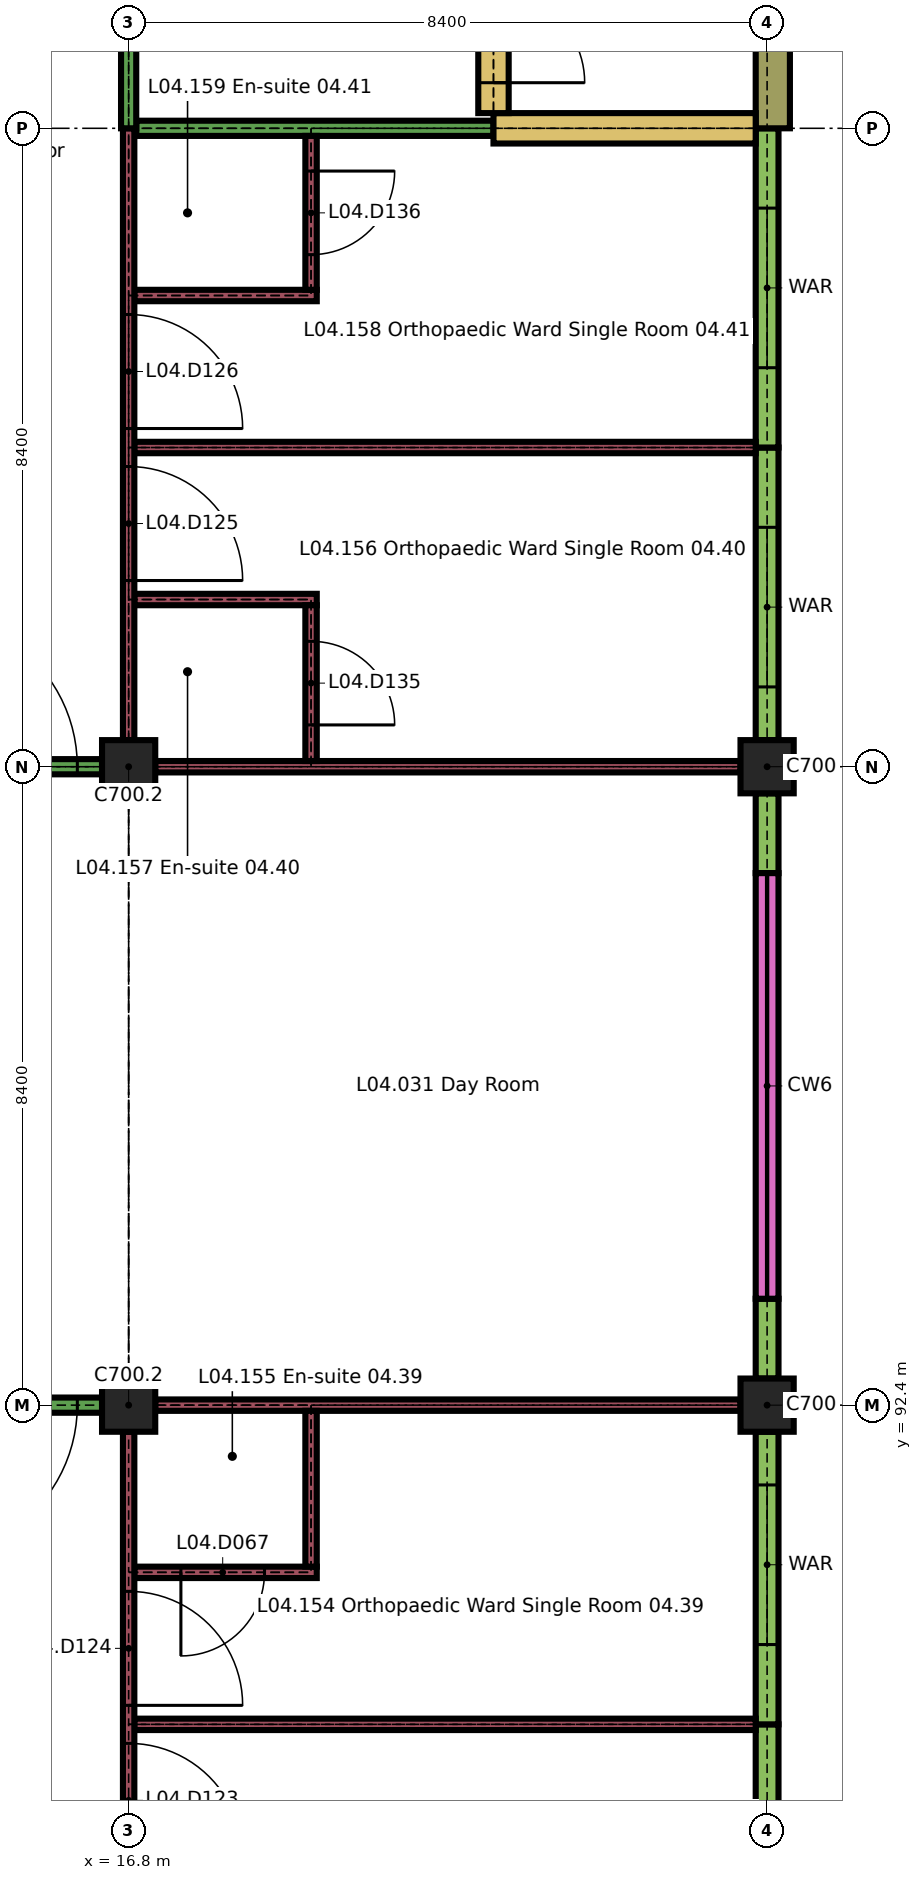
"""IFC4 building model, lengths in metres.
Left out: names, types, materials, properties, quantities, classifications, styles, units other than length and angle.
Written with IfcOpenShell. Run it as: python <this file> out.ifc"""

import sys

from ifc_helpers import new_model, si_unit, direction, frame, frame_2d, origin, origin_2d, place, context, subcontext, project, spatial, rectangle, extrude, element, fill, save


model = new_model("IFC4")
c1 = context("Model", 3, precision=1e-05, world=origin(), true_north=direction((0.0, 1.0)))
c2 = subcontext(c1, "Body", "Model", "MODEL_VIEW")
j1 = project(units=[si_unit("LENGTHUNIT", "METRE"), si_unit("PLANEANGLEUNIT", "RADIAN")], contexts=[c1])
p1 = place(None, origin())
s1 = spatial("IfcSite", under=j1, at=p1, CompositionType="ELEMENT")
p2 = place(p1, origin())
s2 = spatial("IfcBuilding", under=s1, at=p2, CompositionType="ELEMENT")
p3 = place(p2, frame((0.0, 0.0, 18.9)))
s3 = spatial("IfcBuildingStorey", under=s2, at=p3, CompositionType="ELEMENT", Elevation=18.9)
for number, where, z_axis, x_axis in (
    (1, (16.8, 92.4, 0.0), (0.0, 0.0, 1.0), (1.0, 0.0, 0.0)),
    (2, (25.2, 92.4, 0.0), (0.0, 0.0, 1.0), (1.0, 0.0, 0.0)),
    (3, (16.8, 100.8, 0.0), (0.0, 0.0, 1.0), (1.0, 0.0, 0.0)),
    (4, (25.2, 100.8, 0.0), (0.0, 0.0, 1.0), (1.0, 0.0, 0.0)),
):
    element("IfcColumn", number, at=place(p3, frame(where, z_axis=z_axis, x_axis=x_axis)), inside=s3, PredefinedType="COLUMN", context=c2, shape_type="SweptSolid", body=[
        extrude(rectangle(XDim=0.7, YDim=0.7, at=origin_2d()), origin(), (0.0, 0.0, 1.0), 3.26),
    ])
p4 = place(p3, frame((25.2, 84.0, 0.0), z_axis=(0.0, 0.0, 1.0), x_axis=(0.0, 1.0, 0.0)))
e5 = element("IfcWall", 5, at=p4, inside=s3, PredefinedType="SOLIDWALL", context=c2, shape_type="SweptSolid", body=[
    extrude(rectangle(XDim=4.2, YDim=0.3, at=frame_2d((2.1, 0.0))), origin(), (0.0, 0.0, 1.0), 2.96),
])
p5 = place(p4, frame((1.05, 0.0, 0.9)))
e6 = element("IfcOpeningElement", 6, at=p5, cuts=e5, PredefinedType="OPENING", context=c2, shape_type="SweptSolid", body=[
    extrude(rectangle(XDim=2.1, YDim=1.5, at=frame_2d((1.05, 0.75))), frame((0.0, 0.16, 0.0), z_axis=(0.0, -1.0, 0.0), x_axis=(1.0, 0.0, 0.0)), (0.0, 0.0, 1.0), 0.32),
])
p6 = place(p3, frame((25.2, 88.2, 0.0), z_axis=(0.0, 0.0, 1.0), x_axis=(0.0, 1.0, 0.0)))
e7 = element("IfcWall", 7, at=p6, inside=s3, PredefinedType="SOLIDWALL", context=c2, shape_type="SweptSolid", body=[
    extrude(rectangle(XDim=3.85, YDim=0.3, at=frame_2d((1.925, 0.0))), origin(), (0.0, 0.0, 1.0), 2.96),
])
p7 = place(p6, frame((1.05, 0.0, 0.9)))
e8 = element("IfcOpeningElement", 8, at=p7, cuts=e7, PredefinedType="OPENING", context=c2, shape_type="SweptSolid", body=[
    extrude(rectangle(XDim=2.1, YDim=1.5, at=frame_2d((1.05, 0.75))), frame((0.0, 0.16, 0.0), z_axis=(0.0, -1.0, 0.0), x_axis=(1.0, 0.0, 0.0)), (0.0, 0.0, 1.0), 0.32),
])
for number, where, z_axis, x_axis in (
    (9, (25.2, 92.75, 0.0), (0.0, 0.0, 1.0), (0.0, 1.0, 0.0)),
    (10, (25.2, 99.4, 0.0), (0.0, 0.0, 1.0), (0.0, 1.0, 0.0)),
):
    element("IfcWall", number, at=place(p3, frame(where, z_axis=z_axis, x_axis=x_axis)), inside=s3, PredefinedType="SOLIDWALL", context=c2, shape_type="SweptSolid", body=[
        extrude(rectangle(XDim=1.05, YDim=0.3, at=frame_2d((0.525, 0.0))), origin(), (0.0, 0.0, 1.0), 2.96),
    ])
p8 = place(p3, frame((25.2, 93.8, 0.0), z_axis=(0.0, 0.0, 1.0), x_axis=(0.0, 1.0, 0.0)))
e11 = element("IfcWall", 11, at=p8, inside=s3, PredefinedType="SOLIDWALL", context=c2, shape_type="SweptSolid", body=[
    extrude(rectangle(XDim=5.6, YDim=0.3, at=frame_2d((2.8, 0.0))), origin(), (0.0, 0.0, 1.0), 0.6),
])
p9 = place(p3, frame((25.2, 101.15, 0.0), z_axis=(0.0, 0.0, 1.0), x_axis=(0.0, 1.0, 0.0)))
e12 = element("IfcWall", 12, at=p9, inside=s3, PredefinedType="SOLIDWALL", context=c2, shape_type="SweptSolid", body=[
    extrude(rectangle(XDim=3.85, YDim=0.3, at=frame_2d((1.925, 0.0))), origin(), (0.0, 0.0, 1.0), 2.96),
])
p10 = place(p9, frame((0.7, 0.0, 0.9)))
e13 = element("IfcOpeningElement", 13, at=p10, cuts=e12, PredefinedType="OPENING", context=c2, shape_type="SweptSolid", body=[
    extrude(rectangle(XDim=2.1, YDim=1.5, at=frame_2d((1.05, 0.75))), frame((0.0, 0.16, 0.0), z_axis=(0.0, -1.0, 0.0), x_axis=(1.0, 0.0, 0.0)), (0.0, 0.0, 1.0), 0.32),
])
p11 = place(p3, frame((25.2, 105.0, 0.0), z_axis=(0.0, 0.0, 1.0), x_axis=(0.0, 1.0, 0.0)))
e14 = element("IfcWall", 14, at=p11, inside=s3, PredefinedType="SOLIDWALL", context=c2, shape_type="SweptSolid", body=[
    extrude(rectangle(XDim=4.2, YDim=0.3, at=frame_2d((2.1, 0.0))), origin(), (0.0, 0.0, 1.0), 2.96),
])
p12 = place(p11, frame((1.05, 0.0, 0.9)))
e15 = element("IfcOpeningElement", 15, at=p12, cuts=e14, PredefinedType="OPENING", context=c2, shape_type="SweptSolid", body=[
    extrude(rectangle(XDim=2.1, YDim=1.5, at=frame_2d((1.05, 0.75))), frame((0.0, 0.16, 0.0), z_axis=(0.0, -1.0, 0.0), x_axis=(1.0, 0.0, 0.0)), (0.0, 0.0, 1.0), 0.32),
])
p13 = place(p3, frame((25.275, 109.2, 0.0), z_axis=(0.0, 0.0, 1.0), x_axis=(0.0, 1.0, 0.0)))
e16 = element("IfcWall", 16, at=p13, inside=s3, PredefinedType="SOLIDWALL", context=c2, shape_type="SweptSolid", body=[
    extrude(rectangle(XDim=3.15, YDim=0.45, at=frame_2d((1.575, 0.0))), origin(), (0.0, 0.0, 1.0), 3.26),
])
p14 = place(p3, frame((16.875, 88.2, 0.0), z_axis=(0.0, 0.0, 1.0), x_axis=(1.0, 0.0, 0.0)))
e17 = element("IfcWall", 17, at=p14, inside=s3, PredefinedType="PARTITIONING", context=c2, shape_type="SweptSolid", body=[
    extrude(rectangle(XDim=8.175, YDim=0.15, at=frame_2d((4.087, 0.0))), origin(), (0.0, 0.0, 1.0), 3.26),
])
p15 = place(p3, frame((16.875, 90.2, 0.0), z_axis=(0.0, 0.0, 1.0), x_axis=(1.0, 0.0, 0.0)))
e18 = element("IfcWall", 18, at=p15, inside=s3, PredefinedType="PARTITIONING", context=c2, shape_type="SweptSolid", body=[
    extrude(rectangle(XDim=2.4, YDim=0.15, at=frame_2d((1.2, 0.0))), origin(), (0.0, 0.0, 1.0), 3.26),
])
p16 = place(p15, frame((0.613, 0.0, 0.0)))
e19 = element("IfcOpeningElement", 19, at=p16, cuts=e18, PredefinedType="OPENING", context=c2, shape_type="SweptSolid", body=[
    extrude(rectangle(XDim=1.1, YDim=2.1, at=frame_2d((0.55, 1.05))), frame((0.0, 0.085, 0.0), z_axis=(0.0, -1.0, 0.0), x_axis=(1.0, 0.0, 0.0)), (0.0, 0.0, 1.0), 0.17),
])
p17 = place(p3, frame((8.75, 92.4, 0.0), z_axis=(0.0, 0.0, 1.0), x_axis=(1.0, 0.0, 0.0)))
e20 = element("IfcWall", 20, at=p17, inside=s3, PredefinedType="PARTITIONING", context=c2, shape_type="SweptSolid", body=[
    extrude(rectangle(XDim=7.7, YDim=0.2, at=frame_2d((3.85, 0.0))), origin(), (0.0, 0.0, 1.0), 3.26),
])
p18 = place(p17, frame((0.325, 0.0, 0.0)))
e21 = element("IfcOpeningElement", 21, at=p18, cuts=e20, PredefinedType="OPENING", context=c2, shape_type="SweptSolid", body=[
    extrude(rectangle(XDim=2.0, YDim=2.4, at=frame_2d((1.0, 1.2))), frame((0.0, 0.11, 0.0), z_axis=(0.0, -1.0, 0.0), x_axis=(1.0, 0.0, 0.0)), (0.0, 0.0, 1.0), 0.22),
])
p19 = place(p17, frame((5.375, 0.0, 0.0)))
e22 = element("IfcOpeningElement", 22, at=p19, cuts=e20, PredefinedType="OPENING", context=c2, shape_type="SweptSolid", body=[
    extrude(rectangle(XDim=2.0, YDim=2.4, at=frame_2d((1.0, 1.2))), frame((0.0, 0.11, 0.0), z_axis=(0.0, -1.0, 0.0), x_axis=(1.0, 0.0, 0.0)), (0.0, 0.0, 1.0), 0.22),
])
p20 = place(p3, frame((17.15, 92.4, 0.0), z_axis=(0.0, 0.0, 1.0), x_axis=(1.0, 0.0, 0.0)))
e23 = element("IfcWall", 23, at=p20, inside=s3, PredefinedType="PARTITIONING", context=c2, shape_type="SweptSolid", body=[
    extrude(rectangle(XDim=7.7, YDim=0.15, at=frame_2d((3.85, 0.0))), origin(), (0.0, 0.0, 1.0), 3.26),
])
p21 = place(p3, frame((8.75, 100.8, 0.0), z_axis=(0.0, 0.0, 1.0), x_axis=(1.0, 0.0, 0.0)))
e24 = element("IfcWall", 24, at=p21, inside=s3, PredefinedType="PARTITIONING", context=c2, shape_type="SweptSolid", body=[
    extrude(rectangle(XDim=7.7, YDim=0.2, at=frame_2d((3.85, 0.0))), origin(), (0.0, 0.0, 1.0), 3.26),
])
p22 = place(p21, frame((0.325, 0.0, 0.0)))
e25 = element("IfcOpeningElement", 25, at=p22, cuts=e24, PredefinedType="OPENING", context=c2, shape_type="SweptSolid", body=[
    extrude(rectangle(XDim=2.0, YDim=2.4, at=frame_2d((1.0, 1.2))), frame((0.0, 0.11, 0.0), z_axis=(0.0, -1.0, 0.0), x_axis=(1.0, 0.0, 0.0)), (0.0, 0.0, 1.0), 0.22),
])
p23 = place(p21, frame((5.375, 0.0, 0.0)))
e26 = element("IfcOpeningElement", 26, at=p23, cuts=e24, PredefinedType="OPENING", context=c2, shape_type="SweptSolid", body=[
    extrude(rectangle(XDim=2.0, YDim=2.4, at=frame_2d((1.0, 1.2))), frame((0.0, 0.11, 0.0), z_axis=(0.0, -1.0, 0.0), x_axis=(1.0, 0.0, 0.0)), (0.0, 0.0, 1.0), 0.22),
])
p24 = place(p3, frame((17.15, 100.8, 0.0), z_axis=(0.0, 0.0, 1.0), x_axis=(1.0, 0.0, 0.0)))
e27 = element("IfcWall", 27, at=p24, inside=s3, PredefinedType="PARTITIONING", context=c2, shape_type="SweptSolid", body=[
    extrude(rectangle(XDim=7.7, YDim=0.15, at=frame_2d((3.85, 0.0))), origin(), (0.0, 0.0, 1.0), 3.26),
])
p25 = place(p3, frame((16.875, 103.0, 0.0), z_axis=(0.0, 0.0, 1.0), x_axis=(1.0, 0.0, 0.0)))
e28 = element("IfcWall", 28, at=p25, inside=s3, PredefinedType="PARTITIONING", context=c2, shape_type="SweptSolid", body=[
    extrude(rectangle(XDim=2.4, YDim=0.15, at=frame_2d((1.2, 0.0))), origin(), (0.0, 0.0, 1.0), 3.26),
])
p26 = place(p3, frame((16.875, 105.0, 0.0), z_axis=(0.0, 0.0, 1.0), x_axis=(1.0, 0.0, 0.0)))
e29 = element("IfcWall", 29, at=p26, inside=s3, PredefinedType="PARTITIONING", context=c2, shape_type="SweptSolid", body=[
    extrude(rectangle(XDim=8.175, YDim=0.15, at=frame_2d((4.087, 0.0))), origin(), (0.0, 0.0, 1.0), 3.26),
])
p27 = place(p3, frame((16.875, 107.0, 0.0), z_axis=(0.0, 0.0, 1.0), x_axis=(1.0, 0.0, 0.0)))
e30 = element("IfcWall", 30, at=p27, inside=s3, PredefinedType="PARTITIONING", context=c2, shape_type="SweptSolid", body=[
    extrude(rectangle(XDim=2.4, YDim=0.15, at=frame_2d((1.2, 0.0))), origin(), (0.0, 0.0, 1.0), 3.26),
])
p28 = place(p3, frame((16.9, 109.2, 0.0), z_axis=(0.0, 0.0, 1.0), x_axis=(1.0, 0.0, 0.0)))
e31 = element("IfcWall", 31, at=p28, inside=s3, PredefinedType="PARTITIONING", context=c2, shape_type="SweptSolid", body=[
    extrude(rectangle(XDim=4.7, YDim=0.2, at=frame_2d((2.35, 0.0))), origin(), (0.0, 0.0, 1.0), 3.26),
])
p29 = place(p3, frame((21.6, 109.2, 0.0), z_axis=(0.0, 0.0, 1.0), x_axis=(1.0, 0.0, 0.0)))
e32 = element("IfcWall", 32, at=p29, inside=s3, PredefinedType="SHEAR", context=c2, shape_type="SweptSolid", body=[
    extrude(rectangle(XDim=3.45, YDim=0.4, at=frame_2d((1.725, 0.0))), origin(), (0.0, 0.0, 1.0), 3.26),
])
p30 = place(p3, frame((16.8, 84.0, 0.0), z_axis=(0.0, 0.0, 1.0), x_axis=(0.0, 1.0, 0.0)))
e33 = element("IfcWall", 33, at=p30, inside=s3, PredefinedType="PARTITIONING", context=c2, shape_type="SweptSolid", body=[
    extrude(rectangle(XDim=8.05, YDim=0.15, at=frame_2d((4.025, 0.0))), origin(), (0.0, 0.0, 1.0), 3.26),
])
p31 = place(p30, frame((2.45, 0.0, 0.0)))
e34 = element("IfcOpeningElement", 34, at=p31, cuts=e33, PredefinedType="OPENING", context=c2, shape_type="SweptSolid", body=[
    extrude(rectangle(XDim=1.5, YDim=2.4, at=frame_2d((0.75, 1.2))), frame((0.0, 0.085, 0.0), z_axis=(0.0, -1.0, 0.0), x_axis=(1.0, 0.0, 0.0)), (0.0, 0.0, 1.0), 0.17),
])
p32 = place(p30, frame((4.45, 0.0, 0.0)))
e35 = element("IfcOpeningElement", 35, at=p32, cuts=e33, PredefinedType="OPENING", context=c2, shape_type="SweptSolid", body=[
    extrude(rectangle(XDim=1.5, YDim=2.4, at=frame_2d((0.75, 1.2))), frame((0.0, 0.085, 0.0), z_axis=(0.0, -1.0, 0.0), x_axis=(1.0, 0.0, 0.0)), (0.0, 0.0, 1.0), 0.17),
])
p33 = place(p3, frame((16.8, 101.15, 0.0), z_axis=(0.0, 0.0, 1.0), x_axis=(0.0, 1.0, 0.0)))
e36 = element("IfcWall", 36, at=p33, inside=s3, PredefinedType="PARTITIONING", context=c2, shape_type="SweptSolid", body=[
    extrude(rectangle(XDim=8.05, YDim=0.15, at=frame_2d((4.025, 0.0))), origin(), (0.0, 0.0, 1.0), 3.26),
])
p34 = place(p33, frame((2.1, 0.0, 0.0)))
e37 = element("IfcOpeningElement", 37, at=p34, cuts=e36, PredefinedType="OPENING", context=c2, shape_type="SweptSolid", body=[
    extrude(rectangle(XDim=1.5, YDim=2.4, at=frame_2d((0.75, 1.2))), frame((0.0, 0.085, 0.0), z_axis=(0.0, -1.0, 0.0), x_axis=(1.0, 0.0, 0.0)), (0.0, 0.0, 1.0), 0.17),
])
p35 = place(p33, frame((4.1, 0.0, 0.0)))
e38 = element("IfcOpeningElement", 38, at=p35, cuts=e36, PredefinedType="OPENING", context=c2, shape_type="SweptSolid", body=[
    extrude(rectangle(XDim=1.5, YDim=2.4, at=frame_2d((0.75, 1.2))), frame((0.0, 0.085, 0.0), z_axis=(0.0, -1.0, 0.0), x_axis=(1.0, 0.0, 0.0)), (0.0, 0.0, 1.0), 0.17),
])
p36 = place(p3, frame((16.8, 109.2, 0.0), z_axis=(0.0, 0.0, 1.0), x_axis=(0.0, 1.0, 0.0)))
e39 = element("IfcWall", 39, at=p36, inside=s3, PredefinedType="PARTITIONING", context=c2, shape_type="SweptSolid", body=[
    extrude(rectangle(XDim=8.25, YDim=0.2, at=frame_2d((4.125, 0.0))), origin(), (0.0, 0.0, 1.0), 3.26),
])
p37 = place(p36, frame((3.125, 0.0, 0.0)))
e40 = element("IfcOpeningElement", 40, at=p37, cuts=e39, PredefinedType="OPENING", context=c2, shape_type="SweptSolid", body=[
    extrude(rectangle(XDim=2.0, YDim=2.4, at=frame_2d((1.0, 1.2))), frame((0.0, 0.11, 0.0), z_axis=(0.0, -1.0, 0.0), x_axis=(1.0, 0.0, 0.0)), (0.0, 0.0, 1.0), 0.22),
])
p38 = place(p3, frame((19.2, 90.275, 0.0), z_axis=(0.0, 0.0, 1.0), x_axis=(0.0, 1.0, 0.0)))
e41 = element("IfcWall", 41, at=p38, inside=s3, PredefinedType="PARTITIONING", context=c2, shape_type="SweptSolid", body=[
    extrude(rectangle(XDim=2.05, YDim=0.15, at=frame_2d((1.025, 0.0))), origin(), (0.0, 0.0, 1.0), 3.26),
])
p39 = place(p3, frame((19.2, 100.875, 0.0), z_axis=(0.0, 0.0, 1.0), x_axis=(0.0, 1.0, 0.0)))
e42 = element("IfcWall", 42, at=p39, inside=s3, PredefinedType="PARTITIONING", context=c2, shape_type="SweptSolid", body=[
    extrude(rectangle(XDim=2.05, YDim=0.15, at=frame_2d((1.025, 0.0))), origin(), (0.0, 0.0, 1.0), 3.26),
])
p40 = place(p39, frame((0.475, 0.0, 0.0)))
e43 = element("IfcOpeningElement", 43, at=p40, cuts=e42, PredefinedType="OPENING", context=c2, shape_type="SweptSolid", body=[
    extrude(rectangle(XDim=1.1, YDim=2.1, at=frame_2d((0.55, 1.05))), frame((0.0, 0.085, 0.0), z_axis=(0.0, -1.0, 0.0), x_axis=(1.0, 0.0, 0.0)), (0.0, 0.0, 1.0), 0.17),
])
p41 = place(p3, frame((19.2, 107.075, 0.0), z_axis=(0.0, 0.0, 1.0), x_axis=(0.0, 1.0, 0.0)))
e44 = element("IfcWall", 44, at=p41, inside=s3, PredefinedType="PARTITIONING", context=c2, shape_type="SweptSolid", body=[
    extrude(rectangle(XDim=2.025, YDim=0.15, at=frame_2d((1.013, 0.0))), origin(), (0.0, 0.0, 1.0), 3.26),
])
p42 = place(p41, frame((0.462, 0.0, 0.0)))
e45 = element("IfcOpeningElement", 45, at=p42, cuts=e44, PredefinedType="OPENING", context=c2, shape_type="SweptSolid", body=[
    extrude(rectangle(XDim=1.1, YDim=2.1, at=frame_2d((0.55, 1.05))), frame((0.0, 0.085, 0.0), z_axis=(0.0, -1.0, 0.0), x_axis=(1.0, 0.0, 0.0)), (0.0, 0.0, 1.0), 0.17),
])
p43 = place(p3, frame((21.6, 109.4, 0.0), z_axis=(0.0, 0.0, 1.0), x_axis=(0.0, 1.0, 0.0)))
e46 = element("IfcWall", 46, at=p43, inside=s3, PredefinedType="SHEAR", context=c2, shape_type="SweptSolid", body=[
    extrude(rectangle(XDim=8.05, YDim=0.4, at=frame_2d((4.025, 0.0))), origin(), (0.0, 0.0, 1.0), 3.26),
])
p44 = place(p43, frame((0.4, 0.0, 0.0)))
e47 = element("IfcOpeningElement", 47, at=p44, cuts=e46, PredefinedType="OPENING", context=c2, shape_type="SweptSolid", body=[
    extrude(rectangle(XDim=1.2, YDim=2.1, at=frame_2d((0.6, 1.05))), frame((0.0, 0.21, 0.0), z_axis=(0.0, -1.0, 0.0), x_axis=(1.0, 0.0, 0.0)), (0.0, 0.0, 1.0), 0.42),
])
p45 = place(p7, origin())
e48 = element("IfcWindow", 48, at=p45, inside=s3, PartitioningType="DOUBLE_PANEL_VERTICAL", PredefinedType="WINDOW", context=c2, shape_type="SweptSolid", body=[
    extrude(rectangle(XDim=2.1, YDim=1.5, at=frame_2d((1.05, 0.75))), frame((0.0, 0.05, 0.0), z_axis=(0.0, -1.0, 0.0), x_axis=(1.0, 0.0, 0.0)), (0.0, 0.0, 1.0), 0.1),
])
fill(e8, e48)
p46 = place(p10, origin())
e49 = element("IfcWindow", 49, at=p46, inside=s3, PartitioningType="DOUBLE_PANEL_VERTICAL", PredefinedType="WINDOW", context=c2, shape_type="SweptSolid", body=[
    extrude(rectangle(XDim=2.1, YDim=1.5, at=frame_2d((1.05, 0.75))), frame((0.0, 0.05, 0.0), z_axis=(0.0, -1.0, 0.0), x_axis=(1.0, 0.0, 0.0)), (0.0, 0.0, 1.0), 0.1),
])
fill(e13, e49)
p47 = place(p12, origin())
e50 = element("IfcWindow", 50, at=p47, inside=s3, PartitioningType="DOUBLE_PANEL_VERTICAL", PredefinedType="WINDOW", context=c2, shape_type="SweptSolid", body=[
    extrude(rectangle(XDim=2.1, YDim=1.5, at=frame_2d((1.05, 0.75))), frame((0.0, 0.05, 0.0), z_axis=(0.0, -1.0, 0.0), x_axis=(1.0, 0.0, 0.0)), (0.0, 0.0, 1.0), 0.1),
])
fill(e15, e50)
p48 = place(p16, origin())
e51 = element("IfcDoor", 51, at=p48, inside=s3, OperationType="SINGLE_SWING_LEFT", PredefinedType="DOOR", context=c2, shape_type="SweptSolid", body=[
    extrude(rectangle(XDim=1.1, YDim=2.1, at=frame_2d((0.55, 1.05))), frame((0.0, 0.025, 0.0), z_axis=(0.0, -1.0, 0.0), x_axis=(1.0, 0.0, 0.0)), (0.0, 0.0, 1.0), 0.05),
])
fill(e19, e51)
p49 = place(p19, origin())
e52 = element("IfcDoor", 52, at=p49, inside=s3, OperationType="SINGLE_SWING_LEFT", PredefinedType="DOOR", context=c2, shape_type="SweptSolid", body=[
    extrude(rectangle(XDim=2.0, YDim=2.4, at=frame_2d((1.0, 1.2))), frame((0.0, 0.03, 0.0), z_axis=(0.0, -1.0, 0.0), x_axis=(1.0, 0.0, 0.0)), (0.0, 0.0, 1.0), 0.06),
])
fill(e22, e52)
p50 = place(p23, origin())
e53 = element("IfcDoor", 53, at=p50, inside=s3, OperationType="SINGLE_SWING_RIGHT", PredefinedType="DOOR", context=c2, shape_type="SweptSolid", body=[
    extrude(rectangle(XDim=2.0, YDim=2.4, at=frame_2d((1.0, 1.2))), frame((0.0, 0.03, 0.0), z_axis=(0.0, -1.0, 0.0), x_axis=(1.0, 0.0, 0.0)), (0.0, 0.0, 1.0), 0.06),
])
fill(e26, e53)
p51 = place(p31, origin())
e54 = element("IfcDoor", 54, at=p51, inside=s3, OperationType="SINGLE_SWING_LEFT", PredefinedType="DOOR", context=c2, shape_type="SweptSolid", body=[
    extrude(rectangle(XDim=1.5, YDim=2.4, at=frame_2d((0.75, 1.2))), frame((0.0, 0.03, 0.0), z_axis=(0.0, -1.0, 0.0), x_axis=(1.0, 0.0, 0.0)), (0.0, 0.0, 1.0), 0.06),
])
fill(e34, e54)
p52 = place(p32, origin())
e55 = element("IfcDoor", 55, at=p52, inside=s3, OperationType="SINGLE_SWING_LEFT", PredefinedType="DOOR", context=c2, shape_type="SweptSolid", body=[
    extrude(rectangle(XDim=1.5, YDim=2.4, at=frame_2d((0.75, 1.2))), frame((0.0, 0.03, 0.0), z_axis=(0.0, -1.0, 0.0), x_axis=(1.0, 0.0, 0.0)), (0.0, 0.0, 1.0), 0.06),
])
fill(e35, e55)
p53 = place(p34, origin())
e56 = element("IfcDoor", 56, at=p53, inside=s3, OperationType="SINGLE_SWING_LEFT", PredefinedType="DOOR", context=c2, shape_type="SweptSolid", body=[
    extrude(rectangle(XDim=1.5, YDim=2.4, at=frame_2d((0.75, 1.2))), frame((0.0, 0.03, 0.0), z_axis=(0.0, -1.0, 0.0), x_axis=(1.0, 0.0, 0.0)), (0.0, 0.0, 1.0), 0.06),
])
fill(e37, e56)
p54 = place(p35, origin())
e57 = element("IfcDoor", 57, at=p54, inside=s3, OperationType="SINGLE_SWING_LEFT", PredefinedType="DOOR", context=c2, shape_type="SweptSolid", body=[
    extrude(rectangle(XDim=1.5, YDim=2.4, at=frame_2d((0.75, 1.2))), frame((0.0, 0.03, 0.0), z_axis=(0.0, -1.0, 0.0), x_axis=(1.0, 0.0, 0.0)), (0.0, 0.0, 1.0), 0.06),
])
fill(e38, e57)
p55 = place(p40, origin())
e58 = element("IfcDoor", 58, at=p55, inside=s3, OperationType="SINGLE_SWING_LEFT", PredefinedType="DOOR", context=c2, shape_type="SweptSolid", body=[
    extrude(rectangle(XDim=1.1, YDim=2.1, at=frame_2d((0.55, 1.05))), frame((0.0, 0.025, 0.0), z_axis=(0.0, -1.0, 0.0), x_axis=(1.0, 0.0, 0.0)), (0.0, 0.0, 1.0), 0.05),
])
fill(e43, e58)
p56 = place(p42, origin())
e59 = element("IfcDoor", 59, at=p56, inside=s3, OperationType="SINGLE_SWING_RIGHT", PredefinedType="DOOR", context=c2, shape_type="SweptSolid", body=[
    extrude(rectangle(XDim=1.1, YDim=2.1, at=frame_2d((0.55, 1.05))), frame((0.0, 0.025, 0.0), z_axis=(0.0, -1.0, 0.0), x_axis=(1.0, 0.0, 0.0)), (0.0, 0.0, 1.0), 0.05),
])
fill(e45, e59)
p57 = place(p44, origin())
e60 = element("IfcDoor", 60, at=p57, inside=s3, OperationType="SINGLE_SWING_LEFT", PredefinedType="DOOR", context=c2, shape_type="SweptSolid", body=[
    extrude(rectangle(XDim=1.2, YDim=2.1, at=frame_2d((0.6, 1.05))), frame((0.0, 0.025, 0.0), z_axis=(0.0, -1.0, 0.0), x_axis=(1.0, 0.0, 0.0)), (0.0, 0.0, 1.0), 0.05),
])
fill(e47, e60)
save(model, sys.argv[1])
